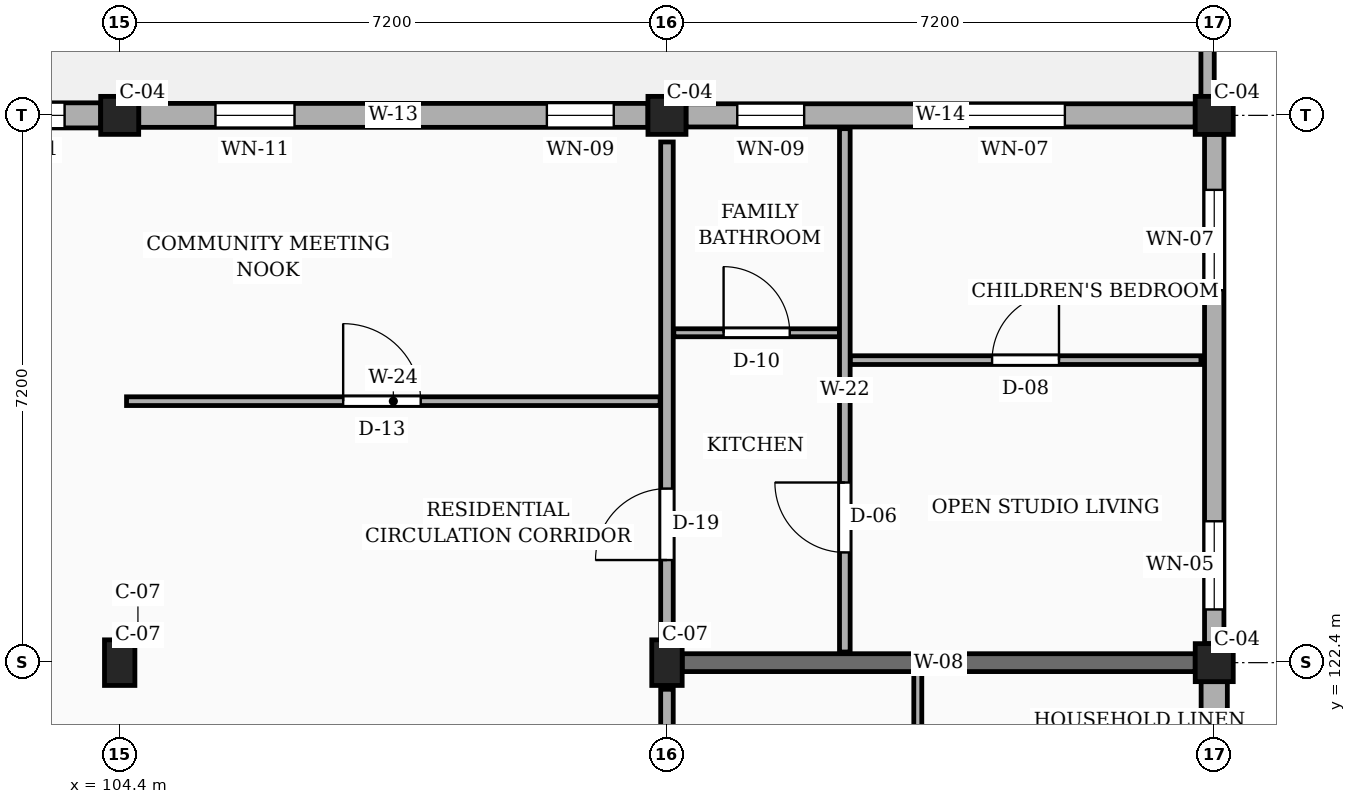
"""IFC4 building model, lengths in metres.
Left out: names, types, materials, properties, quantities, classifications, styles, units other than length and angle.
Written with IfcOpenShell. Run it as: python <this file> out.ifc"""

import sys

from ifc_helpers import new_model, si_unit, direction, frame, frame_2d, origin, origin_2d, place, context, subcontext, project, spatial, rectangle, extrude, element, fill, save


model = new_model("IFC4")
c1 = context("Model", 3, precision=1e-05, world=origin(), true_north=direction((0.0, 1.0)))
c2 = subcontext(c1, "Body", "Model", "MODEL_VIEW")
j1 = project(units=[si_unit("LENGTHUNIT", "METRE"), si_unit("PLANEANGLEUNIT", "RADIAN")], contexts=[c1])
p1 = place(None, origin())
s1 = spatial("IfcSite", under=j1, at=p1, CompositionType="ELEMENT")
p2 = place(p1, origin())
s2 = spatial("IfcBuilding", under=s1, at=p2, CompositionType="ELEMENT")
p3 = place(p2, frame((0.0, 0.0, 23.4)))
s3 = spatial("IfcBuildingStorey", under=s2, at=p3, CompositionType="ELEMENT", Elevation=23.4)
p4 = place(p3, frame((104.4, 122.4, 0.0), z_axis=(0.0, 0.0, 1.0), x_axis=(1.0, 0.0, 0.0)))
e1 = element("IfcColumn", 1, at=p4, inside=s3, PredefinedType="COLUMN", context=c2, shape_type="SweptSolid", body=[
    extrude(rectangle(XDim=0.4, YDim=0.6, at=origin_2d()), origin(), (0.0, 0.0, 1.0), 3.15),
])
p5 = place(p3, frame((104.4, 129.6, 0.0), z_axis=(0.0, 0.0, 1.0), x_axis=(1.0, 0.0, 0.0)))
e2 = element("IfcColumn", 2, at=p5, inside=s3, PredefinedType="COLUMN", context=c2, shape_type="SweptSolid", body=[
    extrude(rectangle(XDim=0.5, YDim=0.5, at=origin_2d()), origin(), (0.0, 0.0, 1.0), 3.15),
])
p6 = place(p3, frame((111.6, 122.4, 0.0), z_axis=(0.0, 0.0, 1.0), x_axis=(1.0, 0.0, 0.0)))
e3 = element("IfcColumn", 3, at=p6, inside=s3, PredefinedType="COLUMN", context=c2, shape_type="SweptSolid", body=[
    extrude(rectangle(XDim=0.4, YDim=0.6, at=origin_2d()), origin(), (0.0, 0.0, 1.0), 3.15),
])
for number, where, z_axis, x_axis in (
    (4, (111.6, 129.6, 0.0), (0.0, 0.0, 1.0), (1.0, 0.0, 0.0)),
    (5, (118.8, 122.4, 0.0), (0.0, 0.0, 1.0), (1.0, 0.0, 0.0)),
    (6, (118.8, 129.6, 0.0), (0.0, 0.0, 1.0), (1.0, 0.0, 0.0)),
):
    element("IfcColumn", number, at=place(p3, frame(where, z_axis=z_axis, x_axis=x_axis)), inside=s3, PredefinedType="COLUMN", context=c2, shape_type="SweptSolid", body=[
        extrude(rectangle(XDim=0.5, YDim=0.5, at=origin_2d()), origin(), (0.0, 0.0, 1.0), 3.15),
    ])
p7 = place(p3, frame((111.8, 122.4, 0.0), z_axis=(0.0, 0.0, 1.0), x_axis=(1.0, 0.0, 0.0)))
e7 = element("IfcWall", 7, at=p7, inside=s3, PredefinedType="SOLIDWALL", context=c2, shape_type="SweptSolid", body=[
    extrude(rectangle(XDim=6.75, YDim=0.235, at=frame_2d((3.375, 0.0))), origin(), (0.0, 0.0, 1.0), 2.19),
])
p8 = place(p3, frame((118.8, 115.45, 0.0), z_axis=(0.0, 0.0, 1.0), x_axis=(0.0, 1.0, 0.0)))
e8 = element("IfcWall", 8, at=p8, inside=s3, PredefinedType="SOLIDWALL", context=c2, shape_type="SweptSolid", body=[
    extrude(rectangle(XDim=6.7, YDim=0.345, at=frame_2d((3.35, 0.0))), origin(), (0.0, 0.0, 1.0), 2.46),
])
p9 = place(p8, frame((0.45, 0.0, 0.78)))
e9 = element("IfcOpeningElement", 9, at=p9, cuts=e8, PredefinedType="OPENING", context=c2, shape_type="SweptSolid", body=[
    extrude(rectangle(XDim=1.0, YDim=1.15, at=frame_2d((0.5, 0.575))), frame((0.0, 0.183, 0.0), z_axis=(0.0, -1.0, 0.0), x_axis=(1.0, 0.0, 0.0)), (0.0, 0.0, 1.0), 0.365),
])
p10 = place(p8, frame((4.65, 0.0, 0.78)))
e10 = element("IfcOpeningElement", 10, at=p10, cuts=e8, PredefinedType="OPENING", context=c2, shape_type="SweptSolid", body=[
    extrude(rectangle(XDim=1.16, YDim=1.15, at=frame_2d((0.58, 0.575))), frame((0.0, 0.183, 0.0), z_axis=(0.0, -1.0, 0.0), x_axis=(1.0, 0.0, 0.0)), (0.0, 0.0, 1.0), 0.365),
])
p11 = place(p3, frame((118.8, 122.65, 0.0), z_axis=(0.0, 0.0, 1.0), x_axis=(0.0, 1.0, 0.0)))
e11 = element("IfcWall", 11, at=p11, inside=s3, PredefinedType="SOLIDWALL", context=c2, shape_type="SweptSolid", body=[
    extrude(rectangle(XDim=6.7, YDim=0.255, at=frame_2d((3.35, 0.0))), origin(), (0.0, 0.0, 1.0), 2.46),
])
p12 = place(p11, frame((0.45, 0.0, 0.78)))
e12 = element("IfcOpeningElement", 12, at=p12, cuts=e11, PredefinedType="OPENING", context=c2, shape_type="SweptSolid", body=[
    extrude(rectangle(XDim=1.16, YDim=1.15, at=frame_2d((0.58, 0.575))), frame((0.0, 0.137, 0.0), z_axis=(0.0, -1.0, 0.0), x_axis=(1.0, 0.0, 0.0)), (0.0, 0.0, 1.0), 0.275),
])
p13 = place(p11, frame((4.65, 0.0, 0.78)))
e13 = element("IfcOpeningElement", 13, at=p13, cuts=e11, PredefinedType="OPENING", context=c2, shape_type="SweptSolid", body=[
    extrude(rectangle(XDim=1.32, YDim=1.15, at=frame_2d((0.66, 0.575))), frame((0.0, 0.137, 0.0), z_axis=(0.0, -1.0, 0.0), x_axis=(1.0, 0.0, 0.0)), (0.0, 0.0, 1.0), 0.275),
])
p14 = place(p3, frame((118.55, 129.6, 0.0), z_axis=(0.0, 0.0, 1.0), x_axis=(-1.0, 0.0, 0.0)))
e14 = element("IfcWall", 14, at=p14, inside=s3, PredefinedType="SOLIDWALL", context=c2, shape_type="SweptSolid", body=[
    extrude(rectangle(XDim=6.7, YDim=0.305, at=frame_2d((3.35, 0.0))), origin(), (0.0, 0.0, 1.0), 2.46),
])
p15 = place(p14, frame((1.715, 0.0, 0.78)))
e15 = element("IfcOpeningElement", 15, at=p15, cuts=e14, PredefinedType="OPENING", context=c2, shape_type="SweptSolid", body=[
    extrude(rectangle(XDim=1.32, YDim=1.15, at=frame_2d((0.66, 0.575))), frame((0.0, 0.163, 0.0), z_axis=(0.0, -1.0, 0.0), x_axis=(1.0, 0.0, 0.0)), (0.0, 0.0, 1.0), 0.325),
])
p16 = place(p14, frame((5.145, 0.0, 0.78)))
e16 = element("IfcOpeningElement", 16, at=p16, cuts=e14, PredefinedType="OPENING", context=c2, shape_type="SweptSolid", body=[
    extrude(rectangle(XDim=0.88, YDim=1.26, at=frame_2d((0.44, 0.63))), frame((0.0, 0.163, 0.0), z_axis=(0.0, -1.0, 0.0), x_axis=(1.0, 0.0, 0.0)), (0.0, 0.0, 1.0), 0.325),
])
p17 = place(p3, frame((111.35, 129.6, 0.0), z_axis=(0.0, 0.0, 1.0), x_axis=(-1.0, 0.0, 0.0)))
e17 = element("IfcWall", 17, at=p17, inside=s3, PredefinedType="SOLIDWALL", context=c2, shape_type="SweptSolid", body=[
    extrude(rectangle(XDim=6.7, YDim=0.315, at=frame_2d((3.35, 0.0))), origin(), (0.0, 0.0, 1.0), 2.46),
])
p18 = place(p17, frame((0.45, 0.0, 0.78)))
e18 = element("IfcOpeningElement", 18, at=p18, cuts=e17, PredefinedType="OPENING", context=c2, shape_type="SweptSolid", body=[
    extrude(rectangle(XDim=0.88, YDim=1.26, at=frame_2d((0.44, 0.63))), frame((0.0, 0.167, 0.0), z_axis=(0.0, -1.0, 0.0), x_axis=(1.0, 0.0, 0.0)), (0.0, 0.0, 1.0), 0.335),
])
p19 = place(p17, frame((4.65, 0.0, 0.78)))
e19 = element("IfcOpeningElement", 19, at=p19, cuts=e17, PredefinedType="OPENING", context=c2, shape_type="SweptSolid", body=[
    extrude(rectangle(XDim=1.04, YDim=1.26, at=frame_2d((0.52, 0.63))), frame((0.0, 0.167, 0.0), z_axis=(0.0, -1.0, 0.0), x_axis=(1.0, 0.0, 0.0)), (0.0, 0.0, 1.0), 0.335),
])
p20 = place(p3, frame((104.15, 129.6, 0.0), z_axis=(0.0, 0.0, 1.0), x_axis=(-1.0, 0.0, 0.0)))
e20 = element("IfcWall", 20, at=p20, inside=s3, PredefinedType="SOLIDWALL", context=c2, shape_type="SweptSolid", body=[
    extrude(rectangle(XDim=6.7, YDim=0.33, at=frame_2d((3.35, 0.0))), origin(), (0.0, 0.0, 1.0), 2.46),
])
p21 = place(p20, frame((0.475, 0.0, 0.78)))
e21 = element("IfcOpeningElement", 21, at=p21, cuts=e20, PredefinedType="OPENING", context=c2, shape_type="SweptSolid", body=[
    extrude(rectangle(XDim=1.04, YDim=1.26, at=frame_2d((0.52, 0.63))), frame((0.0, 0.175, 0.0), z_axis=(0.0, -1.0, 0.0), x_axis=(1.0, 0.0, 0.0)), (0.0, 0.0, 1.0), 0.35),
])
p22 = place(p20, frame((2.18, 0.0, 0.78)))
e22 = element("IfcOpeningElement", 22, at=p22, cuts=e20, PredefinedType="OPENING", context=c2, shape_type="SweptSolid", body=[
    extrude(rectangle(XDim=1.2, YDim=1.26, at=frame_2d((0.6, 0.63))), frame((0.0, 0.175, 0.0), z_axis=(0.0, -1.0, 0.0), x_axis=(1.0, 0.0, 0.0)), (0.0, 0.0, 1.0), 0.35),
])
p23 = place(p20, frame((4.455, 0.0, 0.78)))
e23 = element("IfcOpeningElement", 23, at=p23, cuts=e20, PredefinedType="OPENING", context=c2, shape_type="SweptSolid", body=[
    extrude(rectangle(XDim=1.36, YDim=1.26, at=frame_2d((0.68, 0.63))), frame((0.0, 0.175, 0.0), z_axis=(0.0, -1.0, 0.0), x_axis=(1.0, 0.0, 0.0)), (0.0, 0.0, 1.0), 0.35),
])
p24 = place(p3, frame((118.712, 129.6, 0.0), z_axis=(0.0, 0.0, 1.0), x_axis=(0.0, 1.0, 0.0)))
e24 = element("IfcWall", 24, at=p24, inside=s3, PredefinedType="PARAPET", context=c2, shape_type="SweptSolid", body=[
    extrude(rectangle(XDim=7.025, YDim=0.175, at=frame_2d((3.512, 0.0))), origin(), (0.0, 0.0, 1.0), 1.1),
])
p25 = place(p3, frame((111.6, 115.55, 0.0), z_axis=(0.0, 0.0, 1.0), x_axis=(0.0, 1.0, 0.0)))
e25 = element("IfcWall", 25, at=p25, inside=s3, PredefinedType="PARTITIONING", context=c2, shape_type="SweptSolid", body=[
    extrude(rectangle(XDim=6.5, YDim=0.165, at=frame_2d((3.25, 0.0))), origin(), (0.0, 0.0, 1.0), 2.325),
])
p26 = place(p25, frame((1.1, 0.0, 0.0)))
e26 = element("IfcOpeningElement", 26, at=p26, cuts=e25, PredefinedType="OPENING", context=c2, shape_type="SweptSolid", body=[
    extrude(rectangle(XDim=1.0, YDim=2.15, at=frame_2d((0.5, 1.075))), frame((0.0, 0.093, 0.0), z_axis=(0.0, -1.0, 0.0), x_axis=(1.0, 0.0, 0.0)), (0.0, 0.0, 1.0), 0.185),
])
p27 = place(p3, frame((111.6, 122.75, 0.0), z_axis=(0.0, 0.0, 1.0), x_axis=(0.0, 1.0, 0.0)))
e27 = element("IfcWall", 27, at=p27, inside=s3, PredefinedType="PARTITIONING", context=c2, shape_type="SweptSolid", body=[
    extrude(rectangle(XDim=6.5, YDim=0.165, at=frame_2d((3.25, 0.0))), origin(), (0.0, 0.0, 1.0), 2.325),
])
p28 = place(p27, frame((1.0, 0.0, 0.0)))
e28 = element("IfcOpeningElement", 28, at=p28, cuts=e27, PredefinedType="OPENING", context=c2, shape_type="SweptSolid", body=[
    extrude(rectangle(XDim=0.94, YDim=2.12, at=frame_2d((0.47, 1.06))), frame((0.0, 0.093, 0.0), z_axis=(0.0, -1.0, 0.0), x_axis=(1.0, 0.0, 0.0)), (0.0, 0.0, 1.0), 0.185),
])
p29 = place(p3, frame((114.9, 119.07, 0.0), z_axis=(0.0, 0.0, 1.0), x_axis=(0.0, 1.0, 0.0)))
e29 = element("IfcWall", 29, at=p29, inside=s3, PredefinedType="PARTITIONING", context=c2, shape_type="SweptSolid", body=[
    extrude(rectangle(XDim=3.19, YDim=0.105, at=frame_2d((1.595, 0.0))), origin(), (0.0, 0.0, 1.0), 2.325),
])
p30 = place(p3, frame((104.49, 125.84, 0.0), z_axis=(0.0, 0.0, 1.0), x_axis=(1.0, 0.0, 0.0)))
e30 = element("IfcWall", 30, at=p30, inside=s3, PredefinedType="PARTITIONING", context=c2, shape_type="SweptSolid", body=[
    extrude(rectangle(XDim=7.02, YDim=0.115, at=frame_2d((3.51, 0.0))), origin(), (0.0, 0.0, 1.0), 2.325),
])
p31 = place(p30, frame((2.85, 0.0, 0.0)))
e31 = element("IfcOpeningElement", 31, at=p31, cuts=e30, PredefinedType="OPENING", context=c2, shape_type="SweptSolid", body=[
    extrude(rectangle(XDim=1.02, YDim=2.15, at=frame_2d((0.51, 1.075))), frame((0.0, 0.067, 0.0), z_axis=(0.0, -1.0, 0.0), x_axis=(1.0, 0.0, 0.0)), (0.0, 0.0, 1.0), 0.135),
])
p32 = place(p3, frame((114.01, 126.38, 0.0), z_axis=(0.0, 0.0, 1.0), x_axis=(1.0, 0.0, 0.0)))
e32 = element("IfcWall", 32, at=p32, inside=s3, PredefinedType="PARTITIONING", context=c2, shape_type="SweptSolid", body=[
    extrude(rectangle(XDim=4.615, YDim=0.115, at=frame_2d((2.308, 0.0))), origin(), (0.0, 0.0, 1.0), 2.325),
])
p33 = place(p32, frame((1.867, 0.0, 0.0)))
e33 = element("IfcOpeningElement", 33, at=p33, cuts=e32, PredefinedType="OPENING", context=c2, shape_type="SweptSolid", body=[
    extrude(rectangle(XDim=0.88, YDim=2.08, at=frame_2d((0.44, 1.04))), frame((0.0, 0.067, 0.0), z_axis=(0.0, -1.0, 0.0), x_axis=(1.0, 0.0, 0.0)), (0.0, 0.0, 1.0), 0.135),
])
p34 = place(p3, frame((111.69, 126.74, 0.0), z_axis=(0.0, 0.0, 1.0), x_axis=(1.0, 0.0, 0.0)))
e34 = element("IfcWall", 34, at=p34, inside=s3, PredefinedType="PARTITIONING", context=c2, shape_type="SweptSolid", body=[
    extrude(rectangle(XDim=2.18, YDim=0.105, at=frame_2d((1.09, 0.0))), origin(), (0.0, 0.0, 1.0), 2.325),
])
p35 = place(p34, frame((0.655, 0.0, 0.0)))
e35 = element("IfcOpeningElement", 35, at=p35, cuts=e34, PredefinedType="OPENING", context=c2, shape_type="SweptSolid", body=[
    extrude(rectangle(XDim=0.87, YDim=2.05, at=frame_2d((0.435, 1.025))), frame((0.0, 0.062, 0.0), z_axis=(0.0, -1.0, 0.0), x_axis=(1.0, 0.0, 0.0)), (0.0, 0.0, 1.0), 0.125),
])
p36 = place(p3, frame((113.94, 122.54, 0.0), z_axis=(0.0, 0.0, 1.0), x_axis=(0.0, 1.0, 0.0)))
e36 = element("IfcWall", 36, at=p36, inside=s3, PredefinedType="PARTITIONING", context=c2, shape_type="SweptSolid", body=[
    extrude(rectangle(XDim=6.885, YDim=0.14, at=frame_2d((3.442, 0.0))), origin(), (0.0, 0.0, 1.0), 2.325),
])
p37 = place(p36, frame((1.31, 0.0, 0.0)))
e37 = element("IfcOpeningElement", 37, at=p37, cuts=e36, PredefinedType="OPENING", context=c2, shape_type="SweptSolid", body=[
    extrude(rectangle(XDim=0.92, YDim=2.1, at=frame_2d((0.46, 1.05))), frame((0.0, 0.08, 0.0), z_axis=(0.0, -1.0, 0.0), x_axis=(1.0, 0.0, 0.0)), (0.0, 0.0, 1.0), 0.16),
])
p38 = place(p12, origin())
e38 = element("IfcWindow", 38, at=p38, inside=s3, PartitioningType="SINGLE_PANEL", PredefinedType="WINDOW", context=c2, shape_type="SweptSolid", body=[
    extrude(rectangle(XDim=1.16, YDim=1.15, at=frame_2d((0.58, 0.575))), frame((0.0, 0.03, 0.0), z_axis=(0.0, -1.0, 0.0), x_axis=(1.0, 0.0, 0.0)), (0.0, 0.0, 1.0), 0.06),
])
fill(e12, e38)
p39 = place(p13, origin())
e39 = element("IfcWindow", 39, at=p39, inside=s3, PartitioningType="SINGLE_PANEL", PredefinedType="WINDOW", context=c2, shape_type="SweptSolid", body=[
    extrude(rectangle(XDim=1.32, YDim=1.15, at=frame_2d((0.66, 0.575))), frame((0.0, 0.03, 0.0), z_axis=(0.0, -1.0, 0.0), x_axis=(1.0, 0.0, 0.0)), (0.0, 0.0, 1.0), 0.06),
])
fill(e13, e39)
p40 = place(p15, origin())
e40 = element("IfcWindow", 40, at=p40, inside=s3, PartitioningType="SINGLE_PANEL", PredefinedType="WINDOW", context=c2, shape_type="SweptSolid", body=[
    extrude(rectangle(XDim=1.32, YDim=1.15, at=frame_2d((0.66, 0.575))), frame((0.0, 0.03, 0.0), z_axis=(0.0, -1.0, 0.0), x_axis=(1.0, 0.0, 0.0)), (0.0, 0.0, 1.0), 0.06),
])
fill(e15, e40)
p41 = place(p16, origin())
e41 = element("IfcWindow", 41, at=p41, inside=s3, PartitioningType="SINGLE_PANEL", PredefinedType="WINDOW", context=c2, shape_type="SweptSolid", body=[
    extrude(rectangle(XDim=0.88, YDim=1.26, at=frame_2d((0.44, 0.63))), frame((0.0, 0.03, 0.0), z_axis=(0.0, -1.0, 0.0), x_axis=(1.0, 0.0, 0.0)), (0.0, 0.0, 1.0), 0.06),
])
fill(e16, e41)
p42 = place(p18, origin())
e42 = element("IfcWindow", 42, at=p42, inside=s3, PartitioningType="SINGLE_PANEL", PredefinedType="WINDOW", context=c2, shape_type="SweptSolid", body=[
    extrude(rectangle(XDim=0.88, YDim=1.26, at=frame_2d((0.44, 0.63))), frame((0.0, 0.03, 0.0), z_axis=(0.0, -1.0, 0.0), x_axis=(1.0, 0.0, 0.0)), (0.0, 0.0, 1.0), 0.06),
])
fill(e18, e42)
p43 = place(p19, origin())
e43 = element("IfcWindow", 43, at=p43, inside=s3, PartitioningType="SINGLE_PANEL", PredefinedType="WINDOW", context=c2, shape_type="SweptSolid", body=[
    extrude(rectangle(XDim=1.04, YDim=1.26, at=frame_2d((0.52, 0.63))), frame((0.0, 0.03, 0.0), z_axis=(0.0, -1.0, 0.0), x_axis=(1.0, 0.0, 0.0)), (0.0, 0.0, 1.0), 0.06),
])
fill(e19, e43)
p44 = place(p21, origin())
e44 = element("IfcWindow", 44, at=p44, inside=s3, PartitioningType="SINGLE_PANEL", PredefinedType="WINDOW", context=c2, shape_type="SweptSolid", body=[
    extrude(rectangle(XDim=1.04, YDim=1.26, at=frame_2d((0.52, 0.63))), frame((0.0, 0.03, 0.0), z_axis=(0.0, -1.0, 0.0), x_axis=(1.0, 0.0, 0.0)), (0.0, 0.0, 1.0), 0.06),
])
fill(e21, e44)
p45 = place(p28, origin())
e45 = element("IfcDoor", 45, at=p45, inside=s3, OperationType="SINGLE_SWING_LEFT", PredefinedType="DOOR", context=c2, shape_type="SweptSolid", body=[
    extrude(rectangle(XDim=0.94, YDim=2.12, at=frame_2d((0.47, 1.06))), frame((0.0, 0.025, 0.0), z_axis=(0.0, -1.0, 0.0), x_axis=(1.0, 0.0, 0.0)), (0.0, 0.0, 1.0), 0.05),
])
fill(e28, e45)
p46 = place(p31, origin())
e46 = element("IfcDoor", 46, at=p46, inside=s3, OperationType="SINGLE_SWING_LEFT", PredefinedType="DOOR", context=c2, shape_type="SweptSolid", body=[
    extrude(rectangle(XDim=1.02, YDim=2.15, at=frame_2d((0.51, 1.075))), frame((0.0, 0.025, 0.0), z_axis=(0.0, -1.0, 0.0), x_axis=(1.0, 0.0, 0.0)), (0.0, 0.0, 1.0), 0.05),
])
fill(e31, e46)
p47 = place(p33, origin())
e47 = element("IfcDoor", 47, at=p47, inside=s3, OperationType="SINGLE_SWING_RIGHT", PredefinedType="DOOR", context=c2, shape_type="SweptSolid", body=[
    extrude(rectangle(XDim=0.88, YDim=2.08, at=frame_2d((0.44, 1.04))), frame((0.0, 0.025, 0.0), z_axis=(0.0, -1.0, 0.0), x_axis=(1.0, 0.0, 0.0)), (0.0, 0.0, 1.0), 0.05),
])
fill(e33, e47)
p48 = place(p35, origin())
e48 = element("IfcDoor", 48, at=p48, inside=s3, OperationType="SINGLE_SWING_LEFT", PredefinedType="DOOR", context=c2, shape_type="SweptSolid", body=[
    extrude(rectangle(XDim=0.87, YDim=2.05, at=frame_2d((0.435, 1.025))), frame((0.0, 0.025, 0.0), z_axis=(0.0, -1.0, 0.0), x_axis=(1.0, 0.0, 0.0)), (0.0, 0.0, 1.0), 0.05),
])
fill(e35, e48)
p49 = place(p37, origin())
e49 = element("IfcDoor", 49, at=p49, inside=s3, OperationType="SINGLE_SWING_RIGHT", PredefinedType="DOOR", context=c2, shape_type="SweptSolid", body=[
    extrude(rectangle(XDim=0.92, YDim=2.1, at=frame_2d((0.46, 1.05))), frame((0.0, 0.025, 0.0), z_axis=(0.0, -1.0, 0.0), x_axis=(1.0, 0.0, 0.0)), (0.0, 0.0, 1.0), 0.05),
])
fill(e37, e49)
save(model, sys.argv[1])
